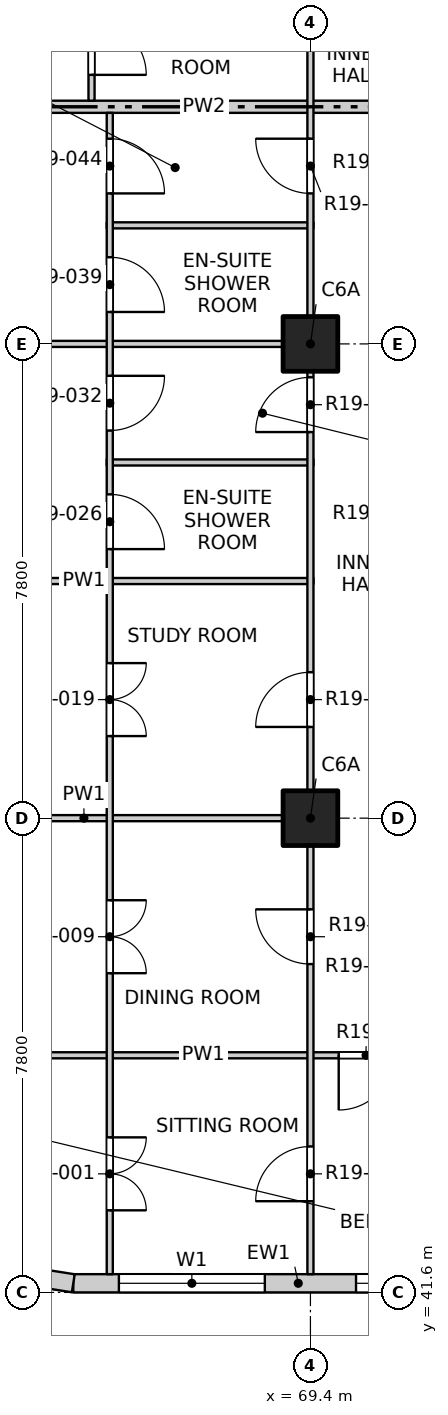
"""IFC4 building model, lengths in metres.
Left out: names, types, materials, properties, quantities, classifications, styles, units other than length and angle.
Written with IfcOpenShell. Run it as: python <this file> out.ifc"""

import sys

from ifc_helpers import new_model, si_unit, direction, frame, frame_2d, origin, origin_2d, place, context, subcontext, project, spatial, rectangle, extrude, element, fill, save


model = new_model("IFC4")
c1 = context("Model", 3, precision=1e-05, world=origin(), true_north=direction((0.0, 1.0)))
c2 = subcontext(c1, "Body", "Model", "MODEL_VIEW")
j1 = project(units=[si_unit("LENGTHUNIT", "METRE"), si_unit("PLANEANGLEUNIT", "RADIAN")], contexts=[c1])
p1 = place(None, origin())
s1 = spatial("IfcSite", under=j1, at=p1, CompositionType="ELEMENT")
p2 = place(p1, origin())
s2 = spatial("IfcBuilding", under=s1, at=p2, CompositionType="ELEMENT")
p3 = place(p2, frame((0.0, 0.0, 197.3)))
s3 = spatial("IfcBuildingStorey", under=s2, at=p3, CompositionType="ELEMENT", Elevation=197.3)
for number, where, z_axis, x_axis in (
    (1, (69.4, 49.4, -0.3), (0.0, 0.0, 1.0), (1.0, 0.0, 0.0)),
    (2, (69.4, 57.2, -0.3), (0.0, 0.0, 1.0), (1.0, 0.0, 0.0)),
):
    element("IfcColumn", number, at=place(p3, frame(where, z_axis=z_axis, x_axis=x_axis)), inside=s3, PredefinedType="COLUMN", context=c2, shape_type="SweptSolid", body=[
        extrude(rectangle(XDim=0.9, YDim=0.9, at=origin_2d()), origin(), (0.0, 0.0, 1.0), 3.45),
    ])
p4 = place(p3, frame((65.5, 41.75, 0.0), z_axis=(0.0, 0.0, 1.0), x_axis=(1.0, 0.0, 0.0)))
e3 = element("IfcWall", 3, at=p4, inside=s3, PredefinedType="SOLIDWALL", context=c2, shape_type="SweptSolid", body=[
    extrude(rectangle(XDim=7.4, YDim=0.3, at=frame_2d((3.7, 0.0))), origin(), (0.0, 0.0, 1.0), 2.7),
])
p5 = place(p4, frame((0.75, 0.0, 0.9)))
e4 = element("IfcOpeningElement", 4, at=p5, cuts=e3, PredefinedType="OPENING", context=c2, shape_type="SweptSolid", body=[
    extrude(rectangle(XDim=2.4, YDim=1.8, at=frame_2d((1.2, 0.9))), frame((0.0, 0.16, 0.0), z_axis=(0.0, -1.0, 0.0), x_axis=(1.0, 0.0, 0.0)), (0.0, 0.0, 1.0), 0.32),
])
p6 = place(p4, frame((4.65, 0.0, 0.9)))
e5 = element("IfcOpeningElement", 5, at=p6, cuts=e3, PredefinedType="OPENING", context=c2, shape_type="SweptSolid", body=[
    extrude(rectangle(XDim=2.4, YDim=1.8, at=frame_2d((1.2, 0.9))), frame((0.0, 0.16, 0.0), z_axis=(0.0, -1.0, 0.0), x_axis=(1.0, 0.0, 0.0)), (0.0, 0.0, 1.0), 0.32),
])
p7 = place(p3, frame((64.341, 41.934, 0.0), z_axis=(0.0, 0.0, 1.0), x_axis=(0.987678452879, -0.156496880861, 0.0)))
e6 = element("IfcWall", 6, at=p7, inside=s3, PredefinedType="SOLIDWALL", context=c2, shape_type="SweptSolid", body=[
    extrude(rectangle(XDim=1.173, YDim=0.3, at=frame_2d((0.586, 0.0))), origin(), (0.0, 0.0, 1.0), 2.7),
])
p8 = place(p3, frame((61.9, 45.5, 0.0), z_axis=(0.0, 0.0, 1.0), x_axis=(1.0, 0.0, 0.0)))
e7 = element("IfcWall", 7, at=p8, inside=s3, PredefinedType="PARTITIONING", context=c2, shape_type="SweptSolid", body=[
    extrude(rectangle(XDim=11.475, YDim=0.1, at=frame_2d((5.737, 0.0))), origin(), (0.0, 0.0, 1.0), 3.15),
])
p9 = place(p8, frame((7.965, 0.0, 0.0)))
e8 = element("IfcOpeningElement", 8, at=p9, cuts=e7, PredefinedType="OPENING", context=c2, shape_type="SweptSolid", body=[
    extrude(rectangle(XDim=0.9, YDim=2.1, at=frame_2d((0.45, 1.05))), frame((0.0, 0.06, 0.0), z_axis=(0.0, -1.0, 0.0), x_axis=(1.0, 0.0, 0.0)), (0.0, 0.0, 1.0), 0.12),
])
for number, where, z_axis, x_axis in (
    (9, (61.9, 49.4, 0.0), (0.0, 0.0, 1.0), (1.0, 0.0, 0.0)),
    (10, (61.9, 53.3, 0.0), (0.0, 0.0, 1.0), (1.0, 0.0, 0.0)),
):
    element("IfcWall", number, at=place(p3, frame(where, z_axis=z_axis, x_axis=x_axis)), inside=s3, PredefinedType="PARTITIONING", context=c2, shape_type="SweptSolid", body=[
        extrude(rectangle(XDim=7.55, YDim=0.1, at=frame_2d((3.775, 0.0))), origin(), (0.0, 0.0, 1.0), 3.15),
    ])
p10 = place(p3, frame((66.05, 55.25, 0.0), z_axis=(0.0, 0.0, 1.0), x_axis=(1.0, 0.0, 0.0)))
e11 = element("IfcWall", 11, at=p10, inside=s3, PredefinedType="PARTITIONING", context=c2, shape_type="SweptSolid", body=[
    extrude(rectangle(XDim=3.4, YDim=0.1, at=frame_2d((1.7, 0.0))), origin(), (0.0, 0.0, 1.0), 3.15),
])
p11 = place(p3, frame((61.9, 57.2, 0.0), z_axis=(0.0, 0.0, 1.0), x_axis=(1.0, 0.0, 0.0)))
e12 = element("IfcWall", 12, at=p11, inside=s3, PredefinedType="PARTITIONING", context=c2, shape_type="SweptSolid", body=[
    extrude(rectangle(XDim=7.55, YDim=0.1, at=frame_2d((3.775, 0.0))), origin(), (0.0, 0.0, 1.0), 3.15),
])
p12 = place(p3, frame((66.05, 59.15, 0.0), z_axis=(0.0, 0.0, 1.0), x_axis=(1.0, 0.0, 0.0)))
e13 = element("IfcWall", 13, at=p12, inside=s3, PredefinedType="PARTITIONING", context=c2, shape_type="SweptSolid", body=[
    extrude(rectangle(XDim=3.4, YDim=0.1, at=frame_2d((1.7, 0.0))), origin(), (0.0, 0.0, 1.0), 3.15),
])
p13 = place(p3, frame((61.9, 61.1, 0.0), z_axis=(0.0, 0.0, 1.0), x_axis=(1.0, 0.0, 0.0)))
e14 = element("IfcWall", 14, at=p13, inside=s3, PredefinedType="PARTITIONING", context=c2, shape_type="SweptSolid", body=[
    extrude(rectangle(XDim=11.5, YDim=0.2, at=frame_2d((5.75, 0.0))), origin(), (0.0, 0.0, 1.0), 2.55),
])
p14 = place(p3, frame((65.8, 61.2, 0.0), z_axis=(0.0, 0.0, 1.0), x_axis=(0.0, 1.0, 0.0)))
e15 = element("IfcWall", 15, at=p14, inside=s3, PredefinedType="PARTITIONING", context=c2, shape_type="SweptSolid", body=[
    extrude(rectangle(XDim=26.9, YDim=0.1, at=frame_2d((13.45, 0.0))), origin(), (0.0, 0.0, 1.0), 3.15),
])
p15 = place(p14, frame((0.425, 0.0, 0.0)))
e16 = element("IfcOpeningElement", 16, at=p15, cuts=e15, PredefinedType="OPENING", context=c2, shape_type="SweptSolid", body=[
    extrude(rectangle(XDim=0.9, YDim=2.1, at=frame_2d((0.45, 1.05))), frame((0.0, 0.06, 0.0), z_axis=(0.0, -1.0, 0.0), x_axis=(1.0, 0.0, 0.0)), (0.0, 0.0, 1.0), 0.12),
])
p16 = place(p14, frame((2.375, 0.0, 0.0)))
e17 = element("IfcOpeningElement", 17, at=p16, cuts=e15, PredefinedType="OPENING", context=c2, shape_type="SweptSolid", body=[
    extrude(rectangle(XDim=0.9, YDim=2.1, at=frame_2d((0.45, 1.05))), frame((0.0, 0.06, 0.0), z_axis=(0.0, -1.0, 0.0), x_axis=(1.0, 0.0, 0.0)), (0.0, 0.0, 1.0), 0.12),
])
p17 = place(p14, frame((5.15, 0.0, 0.0)))
e18 = element("IfcOpeningElement", 18, at=p17, cuts=e15, PredefinedType="OPENING", context=c2, shape_type="SweptSolid", body=[
    extrude(rectangle(XDim=1.2, YDim=2.1, at=frame_2d((0.6, 1.05))), frame((0.0, 0.06, 0.0), z_axis=(0.0, -1.0, 0.0), x_axis=(1.0, 0.0, 0.0)), (0.0, 0.0, 1.0), 0.12),
])
p18 = place(p14, frame((8.225, 0.0, 0.0)))
e19 = element("IfcOpeningElement", 19, at=p18, cuts=e15, PredefinedType="OPENING", context=c2, shape_type="SweptSolid", body=[
    extrude(rectangle(XDim=0.9, YDim=2.1, at=frame_2d((0.45, 1.05))), frame((0.0, 0.06, 0.0), z_axis=(0.0, -1.0, 0.0), x_axis=(1.0, 0.0, 0.0)), (0.0, 0.0, 1.0), 0.12),
])
p19 = place(p14, frame((10.175, 0.0, 0.0)))
e20 = element("IfcOpeningElement", 20, at=p19, cuts=e15, PredefinedType="OPENING", context=c2, shape_type="SweptSolid", body=[
    extrude(rectangle(XDim=0.9, YDim=2.1, at=frame_2d((0.45, 1.05))), frame((0.0, 0.06, 0.0), z_axis=(0.0, -1.0, 0.0), x_axis=(1.0, 0.0, 0.0)), (0.0, 0.0, 1.0), 0.12),
])
p20 = place(p14, frame((12.125, 0.0, 0.0)))
e21 = element("IfcOpeningElement", 21, at=p20, cuts=e15, PredefinedType="OPENING", context=c2, shape_type="SweptSolid", body=[
    extrude(rectangle(XDim=0.9, YDim=2.1, at=frame_2d((0.45, 1.05))), frame((0.0, 0.06, 0.0), z_axis=(0.0, -1.0, 0.0), x_axis=(1.0, 0.0, 0.0)), (0.0, 0.0, 1.0), 0.12),
])
p21 = place(p14, frame((14.075, 0.0, 0.0)))
e22 = element("IfcOpeningElement", 22, at=p21, cuts=e15, PredefinedType="OPENING", context=c2, shape_type="SweptSolid", body=[
    extrude(rectangle(XDim=0.9, YDim=2.1, at=frame_2d((0.45, 1.05))), frame((0.0, 0.06, 0.0), z_axis=(0.0, -1.0, 0.0), x_axis=(1.0, 0.0, 0.0)), (0.0, 0.0, 1.0), 0.12),
])
p22 = place(p14, frame((16.025, 0.0, 0.0)))
e23 = element("IfcOpeningElement", 23, at=p22, cuts=e15, PredefinedType="OPENING", context=c2, shape_type="SweptSolid", body=[
    extrude(rectangle(XDim=0.9, YDim=2.1, at=frame_2d((0.45, 1.05))), frame((0.0, 0.06, 0.0), z_axis=(0.0, -1.0, 0.0), x_axis=(1.0, 0.0, 0.0)), (0.0, 0.0, 1.0), 0.12),
])
p23 = place(p14, frame((17.975, 0.0, 0.0)))
e24 = element("IfcOpeningElement", 24, at=p23, cuts=e15, PredefinedType="OPENING", context=c2, shape_type="SweptSolid", body=[
    extrude(rectangle(XDim=0.9, YDim=2.1, at=frame_2d((0.45, 1.05))), frame((0.0, 0.06, 0.0), z_axis=(0.0, -1.0, 0.0), x_axis=(1.0, 0.0, 0.0)), (0.0, 0.0, 1.0), 0.12),
])
p24 = place(p14, frame((20.75, 0.0, 0.0)))
e25 = element("IfcOpeningElement", 25, at=p24, cuts=e15, PredefinedType="OPENING", context=c2, shape_type="SweptSolid", body=[
    extrude(rectangle(XDim=1.2, YDim=2.1, at=frame_2d((0.6, 1.05))), frame((0.0, 0.06, 0.0), z_axis=(0.0, -1.0, 0.0), x_axis=(1.0, 0.0, 0.0)), (0.0, 0.0, 1.0), 0.12),
])
p25 = place(p14, frame((24.65, 0.0, 0.0)))
e26 = element("IfcOpeningElement", 26, at=p25, cuts=e15, PredefinedType="OPENING", context=c2, shape_type="SweptSolid", body=[
    extrude(rectangle(XDim=1.2, YDim=2.1, at=frame_2d((0.6, 1.05))), frame((0.0, 0.06, 0.0), z_axis=(0.0, -1.0, 0.0), x_axis=(1.0, 0.0, 0.0)), (0.0, 0.0, 1.0), 0.12),
])
p26 = place(p3, frame((66.1, 41.9, 0.0), z_axis=(0.0, 0.0, 1.0), x_axis=(0.0, 1.0, 0.0)))
e27 = element("IfcWall", 27, at=p26, inside=s3, PredefinedType="PARTITIONING", context=c2, shape_type="SweptSolid", body=[
    extrude(rectangle(XDim=19.1, YDim=0.1, at=frame_2d((9.55, 0.0))), origin(), (0.0, 0.0, 1.0), 3.15),
])
p27 = place(p26, frame((1.05, 0.0, 0.0)))
e28 = element("IfcOpeningElement", 28, at=p27, cuts=e27, PredefinedType="OPENING", context=c2, shape_type="SweptSolid", body=[
    extrude(rectangle(XDim=1.2, YDim=2.1, at=frame_2d((0.6, 1.05))), frame((0.0, 0.06, 0.0), z_axis=(0.0, -1.0, 0.0), x_axis=(1.0, 0.0, 0.0)), (0.0, 0.0, 1.0), 0.12),
])
p28 = place(p26, frame((4.95, 0.0, 0.0)))
e29 = element("IfcOpeningElement", 29, at=p28, cuts=e27, PredefinedType="OPENING", context=c2, shape_type="SweptSolid", body=[
    extrude(rectangle(XDim=1.2, YDim=2.1, at=frame_2d((0.6, 1.05))), frame((0.0, 0.06, 0.0), z_axis=(0.0, -1.0, 0.0), x_axis=(1.0, 0.0, 0.0)), (0.0, 0.0, 1.0), 0.12),
])
p29 = place(p26, frame((8.85, 0.0, 0.0)))
e30 = element("IfcOpeningElement", 30, at=p29, cuts=e27, PredefinedType="OPENING", context=c2, shape_type="SweptSolid", body=[
    extrude(rectangle(XDim=1.2, YDim=2.1, at=frame_2d((0.6, 1.05))), frame((0.0, 0.06, 0.0), z_axis=(0.0, -1.0, 0.0), x_axis=(1.0, 0.0, 0.0)), (0.0, 0.0, 1.0), 0.12),
])
p30 = place(p26, frame((11.925, 0.0, 0.0)))
e31 = element("IfcOpeningElement", 31, at=p30, cuts=e27, PredefinedType="OPENING", context=c2, shape_type="SweptSolid", body=[
    extrude(rectangle(XDim=0.9, YDim=2.1, at=frame_2d((0.45, 1.05))), frame((0.0, 0.06, 0.0), z_axis=(0.0, -1.0, 0.0), x_axis=(1.0, 0.0, 0.0)), (0.0, 0.0, 1.0), 0.12),
])
p31 = place(p26, frame((13.875, 0.0, 0.0)))
e32 = element("IfcOpeningElement", 32, at=p31, cuts=e27, PredefinedType="OPENING", context=c2, shape_type="SweptSolid", body=[
    extrude(rectangle(XDim=0.9, YDim=2.1, at=frame_2d((0.45, 1.05))), frame((0.0, 0.06, 0.0), z_axis=(0.0, -1.0, 0.0), x_axis=(1.0, 0.0, 0.0)), (0.0, 0.0, 1.0), 0.12),
])
p32 = place(p26, frame((15.825, 0.0, 0.0)))
e33 = element("IfcOpeningElement", 33, at=p32, cuts=e27, PredefinedType="OPENING", context=c2, shape_type="SweptSolid", body=[
    extrude(rectangle(XDim=0.9, YDim=2.1, at=frame_2d((0.45, 1.05))), frame((0.0, 0.06, 0.0), z_axis=(0.0, -1.0, 0.0), x_axis=(1.0, 0.0, 0.0)), (0.0, 0.0, 1.0), 0.12),
])
p33 = place(p26, frame((17.775, 0.0, 0.0)))
e34 = element("IfcOpeningElement", 34, at=p33, cuts=e27, PredefinedType="OPENING", context=c2, shape_type="SweptSolid", body=[
    extrude(rectangle(XDim=0.9, YDim=2.1, at=frame_2d((0.45, 1.05))), frame((0.0, 0.06, 0.0), z_axis=(0.0, -1.0, 0.0), x_axis=(1.0, 0.0, 0.0)), (0.0, 0.0, 1.0), 0.12),
])
p34 = place(p3, frame((69.4, 41.9, 0.0), z_axis=(0.0, 0.0, 1.0), x_axis=(0.0, 1.0, 0.0)))
e35 = element("IfcWall", 35, at=p34, inside=s3, PredefinedType="PARTITIONING", context=c2, shape_type="SweptSolid", body=[
    extrude(rectangle(XDim=46.2, YDim=0.1, at=frame_2d((23.1, 0.0))), origin(), (0.0, 0.0, 1.0), 3.15),
])
p35 = place(p34, frame((1.2, 0.0, 0.0)))
e36 = element("IfcOpeningElement", 36, at=p35, cuts=e35, PredefinedType="OPENING", context=c2, shape_type="SweptSolid", body=[
    extrude(rectangle(XDim=0.9, YDim=2.1, at=frame_2d((0.45, 1.05))), frame((0.0, 0.06, 0.0), z_axis=(0.0, -1.0, 0.0), x_axis=(1.0, 0.0, 0.0)), (0.0, 0.0, 1.0), 0.12),
])
p36 = place(p34, frame((5.1, 0.0, 0.0)))
e37 = element("IfcOpeningElement", 37, at=p36, cuts=e35, PredefinedType="OPENING", context=c2, shape_type="SweptSolid", body=[
    extrude(rectangle(XDim=0.9, YDim=2.1, at=frame_2d((0.45, 1.05))), frame((0.0, 0.06, 0.0), z_axis=(0.0, -1.0, 0.0), x_axis=(1.0, 0.0, 0.0)), (0.0, 0.0, 1.0), 0.12),
])
p37 = place(p34, frame((9.0, 0.0, 0.0)))
e38 = element("IfcOpeningElement", 38, at=p37, cuts=e35, PredefinedType="OPENING", context=c2, shape_type="SweptSolid", body=[
    extrude(rectangle(XDim=0.9, YDim=2.1, at=frame_2d((0.45, 1.05))), frame((0.0, 0.06, 0.0), z_axis=(0.0, -1.0, 0.0), x_axis=(1.0, 0.0, 0.0)), (0.0, 0.0, 1.0), 0.12),
])
p38 = place(p34, frame((13.85, 0.0, 0.0)))
e39 = element("IfcOpeningElement", 39, at=p38, cuts=e35, PredefinedType="OPENING", context=c2, shape_type="SweptSolid", body=[
    extrude(rectangle(XDim=0.9, YDim=2.1, at=frame_2d((0.45, 1.05))), frame((0.0, 0.06, 0.0), z_axis=(0.0, -1.0, 0.0), x_axis=(1.0, 0.0, 0.0)), (0.0, 0.0, 1.0), 0.12),
])
p39 = place(p34, frame((17.775, 0.0, 0.0)))
e40 = element("IfcOpeningElement", 40, at=p39, cuts=e35, PredefinedType="OPENING", context=c2, shape_type="SweptSolid", body=[
    extrude(rectangle(XDim=0.9, YDim=2.1, at=frame_2d((0.45, 1.05))), frame((0.0, 0.06, 0.0), z_axis=(0.0, -1.0, 0.0), x_axis=(1.0, 0.0, 0.0)), (0.0, 0.0, 1.0), 0.12),
])
p40 = place(p34, frame((21.625, 0.0, 0.0)))
e41 = element("IfcOpeningElement", 41, at=p40, cuts=e35, PredefinedType="OPENING", context=c2, shape_type="SweptSolid", body=[
    extrude(rectangle(XDim=0.9, YDim=2.1, at=frame_2d((0.45, 1.05))), frame((0.0, 0.06, 0.0), z_axis=(0.0, -1.0, 0.0), x_axis=(1.0, 0.0, 0.0)), (0.0, 0.0, 1.0), 0.12),
])
p41 = place(p34, frame((24.6, 0.0, 0.0)))
e42 = element("IfcOpeningElement", 42, at=p41, cuts=e35, PredefinedType="OPENING", context=c2, shape_type="SweptSolid", body=[
    extrude(rectangle(XDim=0.9, YDim=2.1, at=frame_2d((0.45, 1.05))), frame((0.0, 0.06, 0.0), z_axis=(0.0, -1.0, 0.0), x_axis=(1.0, 0.0, 0.0)), (0.0, 0.0, 1.0), 0.12),
])
p42 = place(p34, frame((29.425, 0.0, 0.0)))
e43 = element("IfcOpeningElement", 43, at=p42, cuts=e35, PredefinedType="OPENING", context=c2, shape_type="SweptSolid", body=[
    extrude(rectangle(XDim=0.9, YDim=2.1, at=frame_2d((0.45, 1.05))), frame((0.0, 0.06, 0.0), z_axis=(0.0, -1.0, 0.0), x_axis=(1.0, 0.0, 0.0)), (0.0, 0.0, 1.0), 0.12),
])
p43 = place(p34, frame((33.375, 0.0, 0.0)))
e44 = element("IfcOpeningElement", 44, at=p43, cuts=e35, PredefinedType="OPENING", context=c2, shape_type="SweptSolid", body=[
    extrude(rectangle(XDim=0.9, YDim=2.1, at=frame_2d((0.45, 1.05))), frame((0.0, 0.06, 0.0), z_axis=(0.0, -1.0, 0.0), x_axis=(1.0, 0.0, 0.0)), (0.0, 0.0, 1.0), 0.12),
])
p44 = place(p34, frame((37.225, 0.0, 0.0)))
e45 = element("IfcOpeningElement", 45, at=p44, cuts=e35, PredefinedType="OPENING", context=c2, shape_type="SweptSolid", body=[
    extrude(rectangle(XDim=0.9, YDim=2.1, at=frame_2d((0.45, 1.05))), frame((0.0, 0.06, 0.0), z_axis=(0.0, -1.0, 0.0), x_axis=(1.0, 0.0, 0.0)), (0.0, 0.0, 1.0), 0.12),
])
p45 = place(p34, frame((40.2, 0.0, 0.0)))
e46 = element("IfcOpeningElement", 46, at=p45, cuts=e35, PredefinedType="OPENING", context=c2, shape_type="SweptSolid", body=[
    extrude(rectangle(XDim=0.9, YDim=2.1, at=frame_2d((0.45, 1.05))), frame((0.0, 0.06, 0.0), z_axis=(0.0, -1.0, 0.0), x_axis=(1.0, 0.0, 0.0)), (0.0, 0.0, 1.0), 0.12),
])
p46 = place(p34, frame((44.1, 0.0, 0.0)))
e47 = element("IfcOpeningElement", 47, at=p46, cuts=e35, PredefinedType="OPENING", context=c2, shape_type="SweptSolid", body=[
    extrude(rectangle(XDim=0.9, YDim=2.1, at=frame_2d((0.45, 1.05))), frame((0.0, 0.06, 0.0), z_axis=(0.0, -1.0, 0.0), x_axis=(1.0, 0.0, 0.0)), (0.0, 0.0, 1.0), 0.12),
])
p47 = place(p5, origin())
e48 = element("IfcWindow", 48, at=p47, inside=s3, PartitioningType="DOUBLE_PANEL_VERTICAL", PredefinedType="WINDOW", context=c2, shape_type="SweptSolid", body=[
    extrude(rectangle(XDim=2.4, YDim=1.8, at=frame_2d((1.2, 0.9))), frame((0.0, 0.03, 0.0), z_axis=(0.0, -1.0, 0.0), x_axis=(1.0, 0.0, 0.0)), (0.0, 0.0, 1.0), 0.06),
])
fill(e4, e48)
p48 = place(p6, origin())
e49 = element("IfcWindow", 49, at=p48, inside=s3, PartitioningType="DOUBLE_PANEL_VERTICAL", PredefinedType="WINDOW", context=c2, shape_type="SweptSolid", body=[
    extrude(rectangle(XDim=2.4, YDim=1.8, at=frame_2d((1.2, 0.9))), frame((0.0, 0.03, 0.0), z_axis=(0.0, -1.0, 0.0), x_axis=(1.0, 0.0, 0.0)), (0.0, 0.0, 1.0), 0.06),
])
fill(e5, e49)
p49 = place(p27, origin())
e50 = element("IfcDoor", 50, at=p49, inside=s3, OperationType="DOUBLE_DOOR_SINGLE_SWING", PredefinedType="DOOR", context=c2, shape_type="SweptSolid", body=[
    extrude(rectangle(XDim=1.2, YDim=2.1, at=frame_2d((0.6, 1.05))), frame((0.0, 0.025, 0.0), z_axis=(0.0, -1.0, 0.0), x_axis=(1.0, 0.0, 0.0)), (0.0, 0.0, 1.0), 0.05),
])
fill(e28, e50)
p50 = place(p35, origin())
e51 = element("IfcDoor", 51, at=p50, inside=s3, OperationType="SINGLE_SWING_LEFT", PredefinedType="DOOR", context=c2, shape_type="SweptSolid", body=[
    extrude(rectangle(XDim=0.9, YDim=2.1, at=frame_2d((0.45, 1.05))), frame((0.0, 0.025, 0.0), z_axis=(0.0, -1.0, 0.0), x_axis=(1.0, 0.0, 0.0)), (0.0, 0.0, 1.0), 0.05),
])
fill(e36, e51)
p51 = place(p9, origin())
e52 = element("IfcDoor", 52, at=p51, inside=s3, OperationType="SINGLE_SWING_RIGHT", PredefinedType="DOOR", context=c2, shape_type="SweptSolid", body=[
    extrude(rectangle(XDim=0.9, YDim=2.1, at=frame_2d((0.45, 1.05))), frame((0.0, 0.025, 0.0), z_axis=(0.0, -1.0, 0.0), x_axis=(1.0, 0.0, 0.0)), (0.0, 0.0, 1.0), 0.05),
])
fill(e8, e52)
p52 = place(p28, origin())
e53 = element("IfcDoor", 53, at=p52, inside=s3, OperationType="DOUBLE_DOOR_SINGLE_SWING", PredefinedType="DOOR", context=c2, shape_type="SweptSolid", body=[
    extrude(rectangle(XDim=1.2, YDim=2.1, at=frame_2d((0.6, 1.05))), frame((0.0, 0.025, 0.0), z_axis=(0.0, -1.0, 0.0), x_axis=(1.0, 0.0, 0.0)), (0.0, 0.0, 1.0), 0.05),
])
fill(e29, e53)
p53 = place(p36, origin())
e54 = element("IfcDoor", 54, at=p53, inside=s3, OperationType="SINGLE_SWING_RIGHT", PredefinedType="DOOR", context=c2, shape_type="SweptSolid", body=[
    extrude(rectangle(XDim=0.9, YDim=2.1, at=frame_2d((0.45, 1.05))), frame((0.0, 0.025, 0.0), z_axis=(0.0, -1.0, 0.0), x_axis=(1.0, 0.0, 0.0)), (0.0, 0.0, 1.0), 0.05),
])
fill(e37, e54)
p54 = place(p29, origin())
e55 = element("IfcDoor", 55, at=p54, inside=s3, OperationType="DOUBLE_DOOR_SINGLE_SWING", PredefinedType="DOOR", context=c2, shape_type="SweptSolid", body=[
    extrude(rectangle(XDim=1.2, YDim=2.1, at=frame_2d((0.6, 1.05))), frame((0.0, 0.025, 0.0), z_axis=(0.0, -1.0, 0.0), x_axis=(1.0, 0.0, 0.0)), (0.0, 0.0, 1.0), 0.05),
])
fill(e30, e55)
p55 = place(p37, origin())
e56 = element("IfcDoor", 56, at=p55, inside=s3, OperationType="SINGLE_SWING_LEFT", PredefinedType="DOOR", context=c2, shape_type="SweptSolid", body=[
    extrude(rectangle(XDim=0.9, YDim=2.1, at=frame_2d((0.45, 1.05))), frame((0.0, 0.025, 0.0), z_axis=(0.0, -1.0, 0.0), x_axis=(1.0, 0.0, 0.0)), (0.0, 0.0, 1.0), 0.05),
])
fill(e38, e56)
p56 = place(p30, origin())
e57 = element("IfcDoor", 57, at=p56, inside=s3, OperationType="SINGLE_SWING_RIGHT", PredefinedType="DOOR", context=c2, shape_type="SweptSolid", body=[
    extrude(rectangle(XDim=0.9, YDim=2.1, at=frame_2d((0.45, 1.05))), frame((0.0, 0.025, 0.0), z_axis=(0.0, -1.0, 0.0), x_axis=(1.0, 0.0, 0.0)), (0.0, 0.0, 1.0), 0.05),
])
fill(e31, e57)
p57 = place(p38, origin())
e58 = element("IfcDoor", 58, at=p57, inside=s3, OperationType="SINGLE_SWING_LEFT", PredefinedType="DOOR", context=c2, shape_type="SweptSolid", body=[
    extrude(rectangle(XDim=0.9, YDim=2.1, at=frame_2d((0.45, 1.05))), frame((0.0, 0.025, 0.0), z_axis=(0.0, -1.0, 0.0), x_axis=(1.0, 0.0, 0.0)), (0.0, 0.0, 1.0), 0.05),
])
fill(e39, e58)
p58 = place(p31, origin())
e59 = element("IfcDoor", 59, at=p58, inside=s3, OperationType="SINGLE_SWING_LEFT", PredefinedType="DOOR", context=c2, shape_type="SweptSolid", body=[
    extrude(rectangle(XDim=0.9, YDim=2.1, at=frame_2d((0.45, 1.05))), frame((0.0, 0.025, 0.0), z_axis=(0.0, -1.0, 0.0), x_axis=(1.0, 0.0, 0.0)), (0.0, 0.0, 1.0), 0.05),
])
fill(e32, e59)
p59 = place(p32, origin())
e60 = element("IfcDoor", 60, at=p59, inside=s3, OperationType="SINGLE_SWING_RIGHT", PredefinedType="DOOR", context=c2, shape_type="SweptSolid", body=[
    extrude(rectangle(XDim=0.9, YDim=2.1, at=frame_2d((0.45, 1.05))), frame((0.0, 0.025, 0.0), z_axis=(0.0, -1.0, 0.0), x_axis=(1.0, 0.0, 0.0)), (0.0, 0.0, 1.0), 0.05),
])
fill(e33, e60)
p60 = place(p33, origin())
e61 = element("IfcDoor", 61, at=p60, inside=s3, OperationType="SINGLE_SWING_RIGHT", PredefinedType="DOOR", context=c2, shape_type="SweptSolid", body=[
    extrude(rectangle(XDim=0.9, YDim=2.1, at=frame_2d((0.45, 1.05))), frame((0.0, 0.025, 0.0), z_axis=(0.0, -1.0, 0.0), x_axis=(1.0, 0.0, 0.0)), (0.0, 0.0, 1.0), 0.05),
])
fill(e34, e61)
p61 = place(p39, origin())
e62 = element("IfcDoor", 62, at=p61, inside=s3, OperationType="SINGLE_SWING_RIGHT", PredefinedType="DOOR", context=c2, shape_type="SweptSolid", body=[
    extrude(rectangle(XDim=0.9, YDim=2.1, at=frame_2d((0.45, 1.05))), frame((0.0, 0.025, 0.0), z_axis=(0.0, -1.0, 0.0), x_axis=(1.0, 0.0, 0.0)), (0.0, 0.0, 1.0), 0.05),
])
fill(e40, e62)
p62 = place(p15, origin())
e63 = element("IfcDoor", 63, at=p62, inside=s3, OperationType="SINGLE_SWING_RIGHT", PredefinedType="DOOR", context=c2, shape_type="SweptSolid", body=[
    extrude(rectangle(XDim=0.9, YDim=2.1, at=frame_2d((0.45, 1.05))), frame((0.0, 0.025, 0.0), z_axis=(0.0, -1.0, 0.0), x_axis=(1.0, 0.0, 0.0)), (0.0, 0.0, 1.0), 0.05),
])
fill(e16, e63)
save(model, sys.argv[1])
